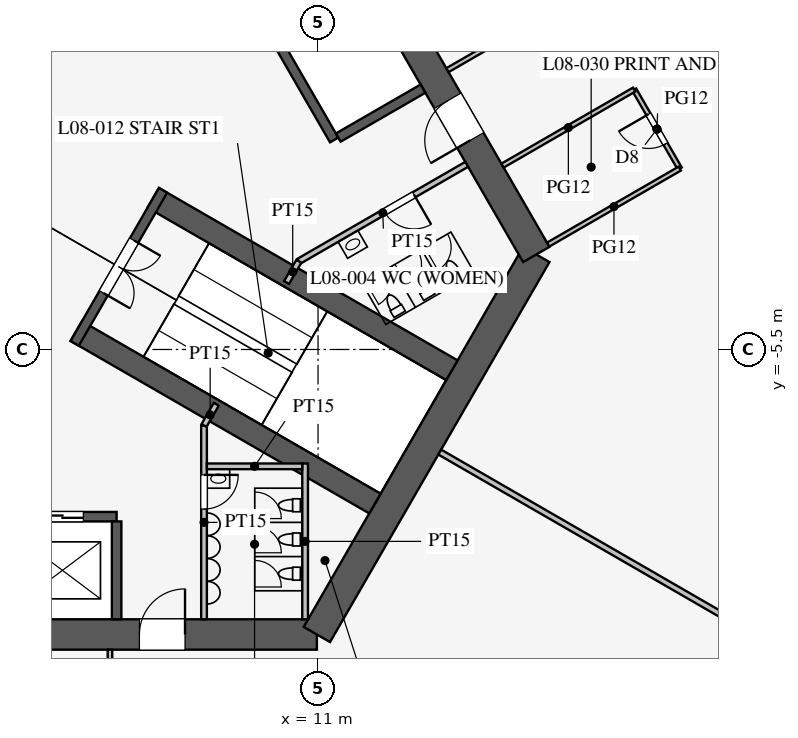
"""IFC4 building model, lengths in metres.
Left out: names, types, materials, properties, quantities, classifications, styles, units other than length and angle.
Written with IfcOpenShell. Run it as: python <this file> out.ifc"""

import sys

from ifc_helpers import new_model, si_unit, direction, frame, frame_2d, origin, place, context, subcontext, project, spatial, rectangle, extrude, element, fill, save


model = new_model("IFC4")
c1 = context("Model", 3, precision=1e-05, world=origin(), true_north=direction((0.0, 1.0)))
c2 = subcontext(c1, "Body", "Model", "MODEL_VIEW")
j1 = project(units=[si_unit("LENGTHUNIT", "METRE"), si_unit("PLANEANGLEUNIT", "RADIAN")], contexts=[c1])
p1 = place(None, origin())
s1 = spatial("IfcSite", under=j1, at=p1, CompositionType="ELEMENT")
p2 = place(p1, origin())
s2 = spatial("IfcBuilding", under=s1, at=p2, CompositionType="ELEMENT")
p3 = place(p2, frame((0.0, 0.0, 37.5)))
s3 = spatial("IfcBuildingStorey", under=s2, at=p3, CompositionType="ELEMENT", Elevation=37.5)
p4 = place(p3, frame((-10.97, -13.0, 0.0), z_axis=(0.0, 0.0, 1.0), x_axis=(1.0, 0.0, 0.0)))
e1 = element("IfcWall", 1, at=p4, inside=s3, PredefinedType="SHEAR", context=c2, shape_type="SweptSolid", body=[
    extrude(rectangle(XDim=21.939, YDim=0.8, at=frame_2d((10.97, 0.0))), origin(), (0.0, 0.0, 1.0), 4.2),
])
p5 = place(p4, frame((17.27, 0.0, 0.0)))
e2 = element("IfcOpeningElement", 2, at=p5, cuts=e1, PredefinedType="OPENING", context=c2, shape_type="SweptSolid", body=[
    extrude(rectangle(XDim=1.2, YDim=2.1, at=frame_2d((0.6, 1.05))), frame((0.0, 0.41, 0.0), z_axis=(0.0, -1.0, 0.0), x_axis=(1.0, 0.0, 0.0)), (0.0, 0.0, 1.0), 0.82),
])
p6 = place(p4, frame((3.47, 0.0, 0.0)))
e3 = element("IfcOpeningElement", 3, at=p6, cuts=e1, PredefinedType="OPENING", context=c2, shape_type="SweptSolid", body=[
    extrude(rectangle(XDim=1.2, YDim=2.1, at=frame_2d((0.6, 1.05))), frame((0.0, 0.41, 0.0), z_axis=(0.0, -1.0, 0.0), x_axis=(1.0, 0.0, 0.0)), (0.0, 0.0, 1.0), 0.82),
])
p7 = place(p3, frame((10.97, -13.0, 0.0), z_axis=(0.0, 0.0, 1.0), x_axis=(0.499995765644, 0.866027848477, 0.0)))
e4 = element("IfcWall", 4, at=p7, inside=s3, PredefinedType="SHEAR", context=c2, shape_type="SweptSolid", body=[
    extrude(rectangle(XDim=11.547, YDim=0.8, at=frame_2d((5.773, 0.0))), origin(), (0.0, 0.0, 1.0), 4.2),
])
p8 = place(p3, frame((16.743, -3.0, 0.0), z_axis=(0.0, 0.0, 1.0), x_axis=(-0.500002442456, 0.866023993627, 0.0)))
e5 = element("IfcWall", 5, at=p8, inside=s3, PredefinedType="SHEAR", context=c2, shape_type="SweptSolid", body=[
    extrude(rectangle(XDim=21.939, YDim=0.8, at=frame_2d((10.97, 0.0))), origin(), (0.0, 0.0, 1.0), 4.2),
])
p9 = place(p8, frame((17.27, 0.0, 0.0)))
e6 = element("IfcOpeningElement", 6, at=p9, cuts=e5, PredefinedType="OPENING", context=c2, shape_type="SweptSolid", body=[
    extrude(rectangle(XDim=1.2, YDim=2.1, at=frame_2d((0.6, 1.05))), frame((0.0, 0.41, 0.0), z_axis=(0.0, -1.0, 0.0), x_axis=(1.0, 0.0, 0.0)), (0.0, 0.0, 1.0), 0.82),
])
p10 = place(p8, frame((3.47, 0.0, 0.0)))
e7 = element("IfcOpeningElement", 7, at=p10, cuts=e5, PredefinedType="OPENING", context=c2, shape_type="SweptSolid", body=[
    extrude(rectangle(XDim=1.2, YDim=2.1, at=frame_2d((0.6, 1.05))), frame((0.0, 0.41, 0.0), z_axis=(0.0, -1.0, 0.0), x_axis=(1.0, 0.0, 0.0)), (0.0, 0.0, 1.0), 0.82),
])
p11 = place(p3, frame((-5.7, -9.9, 0.0), z_axis=(0.0, 0.0, 1.0), x_axis=(1.0, 0.0, 0.0)))
e8 = element("IfcWall", 8, at=p11, inside=s3, PredefinedType="SHEAR", context=c2, shape_type="SweptSolid", body=[
    extrude(rectangle(XDim=11.4, YDim=0.25, at=frame_2d((5.7, 0.0))), origin(), (0.0, 0.0, 1.0), 4.2),
])
p12 = place(p11, frame((0.875, 0.0, 0.0)))
e9 = element("IfcOpeningElement", 9, at=p12, cuts=e8, PredefinedType="OPENING", context=c2, shape_type="SweptSolid", body=[
    extrude(rectangle(XDim=1.1, YDim=2.2, at=frame_2d((0.55, 1.1))), frame((0.0, 0.135, 0.0), z_axis=(0.0, -1.0, 0.0), x_axis=(1.0, 0.0, 0.0)), (0.0, 0.0, 1.0), 0.27),
])
p13 = place(p11, frame((3.725, 0.0, 0.0)))
e10 = element("IfcOpeningElement", 10, at=p13, cuts=e8, PredefinedType="OPENING", context=c2, shape_type="SweptSolid", body=[
    extrude(rectangle(XDim=1.1, YDim=2.2, at=frame_2d((0.55, 1.1))), frame((0.0, 0.135, 0.0), z_axis=(0.0, -1.0, 0.0), x_axis=(1.0, 0.0, 0.0)), (0.0, 0.0, 1.0), 0.27),
])
p14 = place(p11, frame((6.575, 0.0, 0.0)))
e11 = element("IfcOpeningElement", 11, at=p14, cuts=e8, PredefinedType="OPENING", context=c2, shape_type="SweptSolid", body=[
    extrude(rectangle(XDim=1.1, YDim=2.2, at=frame_2d((0.55, 1.1))), frame((0.0, 0.135, 0.0), z_axis=(0.0, -1.0, 0.0), x_axis=(1.0, 0.0, 0.0)), (0.0, 0.0, 1.0), 0.27),
])
p15 = place(p11, frame((9.425, 0.0, 0.0)))
e12 = element("IfcOpeningElement", 12, at=p15, cuts=e8, PredefinedType="OPENING", context=c2, shape_type="SweptSolid", body=[
    extrude(rectangle(XDim=1.1, YDim=2.2, at=frame_2d((0.55, 1.1))), frame((0.0, 0.135, 0.0), z_axis=(0.0, -1.0, 0.0), x_axis=(1.0, 0.0, 0.0)), (0.0, 0.0, 1.0), 0.27),
])
p16 = place(p3, frame((5.7, -10.025, 0.0), z_axis=(0.0, 0.0, 1.0), x_axis=(0.0, -1.0, 0.0)))
e13 = element("IfcWall", 13, at=p16, inside=s3, PredefinedType="SHEAR", context=c2, shape_type="SweptSolid", body=[
    extrude(rectangle(XDim=2.575, YDim=0.25, at=frame_2d((1.288, 0.0))), origin(), (0.0, 0.0, 1.0), 4.2),
])
p17 = place(p3, frame((11.424, 0.014, 0.0), z_axis=(0.0, 0.0, 1.0), x_axis=(-0.500001763848, 0.866024385424, 0.0)))
e14 = element("IfcWall", 14, at=p17, inside=s3, PredefinedType="SHEAR", context=c2, shape_type="SweptSolid", body=[
    extrude(rectangle(XDim=11.4, YDim=0.25, at=frame_2d((5.7, 0.0))), origin(), (0.0, 0.0, 1.0), 4.2),
])
p18 = place(p3, frame((11.532, 0.076, 0.0), z_axis=(0.0, 0.0, 1.0), x_axis=(0.866005588531, 0.500034319456, 0.0)))
e15 = element("IfcWall", 15, at=p18, inside=s3, PredefinedType="SHEAR", context=c2, shape_type="SweptSolid", body=[
    extrude(rectangle(XDim=2.575, YDim=0.25, at=frame_2d((1.288, 0.0))), origin(), (0.0, 0.0, 1.0), 4.2),
])
for number, where, z_axis, x_axis in (
    (16, (4.638, -5.016, 0.0), (0.0, 0.0, 1.0), (0.866, -0.5, 0.0)),
    (17, (6.663, -1.509, 0.0), (0.0, 0.0, 1.0), (0.866, -0.5, 0.0)),
):
    element("IfcWall", number, at=place(p3, frame(where, z_axis=z_axis, x_axis=x_axis)), inside=s3, PredefinedType="SHEAR", context=c2, shape_type="SweptSolid", body=[
        extrude(rectangle(XDim=9.075, YDim=0.6, at=frame_2d((4.538, 0.0))), origin(), (0.0, 0.0, 1.0), 4.2),
    ])
p19 = place(p3, frame((4.597, -5.339, 0.0), z_axis=(0.0, 0.0, 1.0), x_axis=(0.499984536904, 0.866034331223, 0.0)))
e18 = element("IfcWall", 18, at=p19, inside=s3, PredefinedType="SHEAR", context=c2, shape_type="SweptSolid", body=[
    extrude(rectangle(XDim=4.65, YDim=0.25, at=frame_2d((2.325, 0.0))), origin(), (0.0, 0.0, 1.0), 4.2),
])
p20 = place(p19, frame((1.525, 0.0, 0.0)))
e19 = element("IfcOpeningElement", 19, at=p20, cuts=e18, PredefinedType="OPENING", context=c2, shape_type="SweptSolid", body=[
    extrude(rectangle(XDim=1.6, YDim=2.1, at=frame_2d((0.8, 1.05))), frame((0.0, 0.135, 0.0), z_axis=(0.0, -1.0, 0.0), x_axis=(1.0, 0.0, 0.0)), (0.0, 0.0, 1.0), 0.27),
])
p21 = place(p3, frame((8.0, -7.5, 0.0), z_axis=(0.0, 0.0, 1.0), x_axis=(0.0, -1.0, 0.0)))
e20 = element("IfcWall", 20, at=p21, inside=s3, PredefinedType="PARTITIONING", context=c2, shape_type="SweptSolid", body=[
    extrude(rectangle(XDim=5.1, YDim=0.15, at=frame_2d((2.55, 0.0))), origin(), (0.0, 0.0, 1.0), 4.0),
])
p22 = place(p21, frame((1.3, 0.0, 0.0)))
e21 = element("IfcOpeningElement", 21, at=p22, cuts=e20, PredefinedType="OPENING", context=c2, shape_type="SweptSolid", body=[
    extrude(rectangle(XDim=0.9, YDim=2.1, at=frame_2d((0.45, 1.05))), frame((0.0, 0.085, 0.0), z_axis=(0.0, -1.0, 0.0), x_axis=(1.0, 0.0, 0.0)), (0.0, 0.0, 1.0), 0.17),
])
p23 = place(p3, frame((10.495, -3.178, 0.0), z_axis=(0.0, 0.0, 1.0), x_axis=(0.86602216432, 0.500005610874, 0.0)))
e22 = element("IfcWall", 22, at=p23, inside=s3, PredefinedType="PARTITIONING", context=c2, shape_type="SweptSolid", body=[
    extrude(rectangle(XDim=5.1, YDim=0.15, at=frame_2d((2.55, 0.0))), origin(), (0.0, 0.0, 1.0), 4.0),
])
p24 = place(p23, frame((2.6, 0.0, 0.0)))
e23 = element("IfcOpeningElement", 23, at=p24, cuts=e22, PredefinedType="OPENING", context=c2, shape_type="SweptSolid", body=[
    extrude(rectangle(XDim=0.9, YDim=2.1, at=frame_2d((0.45, 1.05))), frame((0.0, 0.085, 0.0), z_axis=(0.0, -1.0, 0.0), x_axis=(1.0, 0.0, 0.0)), (0.0, 0.0, 1.0), 0.17),
])
for number, where, z_axis, x_axis in (
    (24, (8.0, -7.5, 0.0), (0.0, 0.0, 1.0), (0.5, 0.866, 0.0)),
    (25, (10.495, -3.178, 0.0), (0.0, 0.0, 1.0), (-0.5, -0.866, 0.0)),
):
    element("IfcWall", number, at=place(p3, frame(where, z_axis=z_axis, x_axis=x_axis)), inside=s3, PredefinedType="PARTITIONING", context=c2, shape_type="SweptSolid", body=[
        extrude(rectangle(XDim=0.645, YDim=0.15, at=frame_2d((0.323, 0.0))), origin(), (0.0, 0.0, 1.0), 4.0),
    ])
p25 = place(p3, frame((10.66, -8.5, 0.0), z_axis=(0.0, 0.0, 1.0), x_axis=(0.0, -1.0, 0.0)))
e26 = element("IfcWall", 26, at=p25, inside=s3, PredefinedType="PARTITIONING", context=c2, shape_type="SweptSolid", body=[
    extrude(rectangle(XDim=4.1, YDim=0.15, at=frame_2d((2.05, 0.0))), origin(), (0.0, 0.0, 1.0), 4.0),
])
p26 = place(p3, frame((8.075, -8.575, 0.0), z_axis=(0.0, 0.0, 1.0), x_axis=(1.0, 0.0, 0.0)))
e27 = element("IfcWall", 27, at=p26, inside=s3, PredefinedType="PARTITIONING", context=c2, shape_type="SweptSolid", body=[
    extrude(rectangle(XDim=2.51, YDim=0.15, at=frame_2d((1.255, 0.0))), origin(), (0.0, 0.0, 1.0), 4.0),
])
p27 = place(p3, frame((14.203, -8.2, 0.0), z_axis=(0.0, 0.0, 1.0), x_axis=(0.866024965723, -0.500000758745, 0.0)))
e28 = element("IfcWall", 28, at=p27, inside=s3, PredefinedType="PARTITIONING", context=c2, shape_type="SweptSolid", body=[
    extrude(rectangle(XDim=18.25, YDim=0.15, at=frame_2d((9.125, 0.0))), origin(), (0.0, 0.0, 1.0), 2.3),
])
p28 = place(p3, frame((5.525, -13.4, 0.0), z_axis=(0.0, 0.0, 1.0), x_axis=(0.0, -1.0, 0.0)))
e29 = element("IfcWall", 29, at=p28, inside=s3, PredefinedType="PARTITIONING", context=c2, shape_type="SweptSolid", body=[
    extrude(rectangle(XDim=4.0, YDim=0.12, at=frame_2d((2.0, 0.0))), origin(), (0.0, 0.0, 1.0), 2.9),
])
p29 = place(p3, frame((20.519, -0.74, 0.0), z_axis=(0.0, 0.0, 1.0), x_axis=(-0.499957262057, 0.866050077142, 0.0)))
e30 = element("IfcWall", 30, at=p29, inside=s3, PredefinedType="PARTITIONING", context=c2, shape_type="SweptSolid", body=[
    extrude(rectangle(XDim=2.4, YDim=0.12, at=frame_2d((1.2, 0.0))), origin(), (0.0, 0.0, 1.0), 2.9),
])
p30 = place(p29, frame((0.75, 0.0, 0.15)))
e31 = element("IfcOpeningElement", 31, at=p30, cuts=e30, PredefinedType="OPENING", context=c2, shape_type="SweptSolid", body=[
    extrude(rectangle(XDim=0.9, YDim=2.1, at=frame_2d((0.45, 1.05))), frame((0.0, 0.07, 0.0), z_axis=(0.0, -1.0, 0.0), x_axis=(1.0, 0.0, 0.0)), (0.0, 0.0, 1.0), 0.14),
])
for number, where, z_axis, x_axis in (
    (32, (17.055, -2.74, 0.0), (0.0, 0.0, 1.0), (0.866, 0.5, 0.0)),
    (33, (14.405, 1.85, 0.0), (0.0, 0.0, 1.0), (0.866, 0.5, 0.0)),
    (34, (15.855, -0.661, 0.0), (0.0, 0.0, 1.0), (0.866, 0.5, 0.0)),
):
    element("IfcWall", number, at=place(p3, frame(where, z_axis=z_axis, x_axis=x_axis)), inside=s3, PredefinedType="PARTITIONING", context=c2, shape_type="SweptSolid", body=[
        extrude(rectangle(XDim=4.0, YDim=0.12, at=frame_2d((2.0, 0.0))), origin(), (0.0, 0.0, 1.0), 2.9),
    ])
p31 = place(p22, origin())
e35 = element("IfcDoor", 35, at=p31, inside=s3, OperationType="SINGLE_SWING_LEFT", PredefinedType="DOOR", context=c2, shape_type="SweptSolid", body=[
    extrude(rectangle(XDim=0.9, YDim=2.1, at=frame_2d((0.45, 1.05))), frame((0.0, 0.025, 0.0), z_axis=(0.0, -1.0, 0.0), x_axis=(1.0, 0.0, 0.0)), (0.0, 0.0, 1.0), 0.05),
])
fill(e21, e35)
p32 = place(p24, frame((0.9, 0.0, 0.0), z_axis=(0.0, 0.0, 1.0), x_axis=(-1.0, 0.0, 0.0)))
e36 = element("IfcDoor", 36, at=p32, inside=s3, OperationType="SINGLE_SWING_LEFT", PredefinedType="DOOR", context=c2, shape_type="SweptSolid", body=[
    extrude(rectangle(XDim=0.9, YDim=2.1, at=frame_2d((0.45, 1.05))), frame((0.0, 0.025, 0.0), z_axis=(0.0, -1.0, 0.0), x_axis=(1.0, 0.0, 0.0)), (0.0, 0.0, 1.0), 0.05),
])
fill(e23, e36)
p33 = place(p20, frame((1.6, 0.0, 0.0), z_axis=(0.0, 0.0, 1.0), x_axis=(-1.0, 0.0, 0.0)))
e37 = element("IfcDoor", 37, at=p33, inside=s3, OperationType="DOUBLE_DOOR_SINGLE_SWING", PredefinedType="DOOR", context=c2, shape_type="SweptSolid", body=[
    extrude(rectangle(XDim=1.6, YDim=2.1, at=frame_2d((0.8, 1.05))), frame((0.0, 0.025, 0.0), z_axis=(0.0, -1.0, 0.0), x_axis=(1.0, 0.0, 0.0)), (0.0, 0.0, 1.0), 0.05),
])
fill(e19, e37)
p34 = place(p5, origin())
e38 = element("IfcDoor", 38, at=p34, inside=s3, OperationType="SINGLE_SWING_RIGHT", PredefinedType="DOOR", context=c2, shape_type="SweptSolid", body=[
    extrude(rectangle(XDim=1.2, YDim=2.1, at=frame_2d((0.6, 1.05))), frame((0.0, 0.025, 0.0), z_axis=(0.0, -1.0, 0.0), x_axis=(1.0, 0.0, 0.0)), (0.0, 0.0, 1.0), 0.05),
])
fill(e2, e38)
p35 = place(p10, origin())
e39 = element("IfcDoor", 39, at=p35, inside=s3, OperationType="SINGLE_SWING_LEFT", PredefinedType="DOOR", context=c2, shape_type="SweptSolid", body=[
    extrude(rectangle(XDim=1.2, YDim=2.1, at=frame_2d((0.6, 1.05))), frame((0.0, 0.025, 0.0), z_axis=(0.0, -1.0, 0.0), x_axis=(1.0, 0.0, 0.0)), (0.0, 0.0, 1.0), 0.05),
])
fill(e7, e39)
p36 = place(p30, origin())
e40 = element("IfcDoor", 40, at=p36, inside=s3, OperationType="SINGLE_SWING_RIGHT", PredefinedType="DOOR", context=c2, shape_type="SweptSolid", body=[
    extrude(rectangle(XDim=0.9, YDim=2.1, at=frame_2d((0.45, 1.05))), frame((0.0, 0.025, 0.0), z_axis=(0.0, -1.0, 0.0), x_axis=(1.0, 0.0, 0.0)), (0.0, 0.0, 1.0), 0.05),
])
fill(e31, e40)
p37 = place(p15, origin())
e41 = element("IfcDoor", 41, at=p37, inside=s3, OperationType="DOUBLE_DOOR_SLIDING", PredefinedType="DOOR", context=c2, shape_type="SweptSolid", body=[
    extrude(rectangle(XDim=1.1, YDim=2.2, at=frame_2d((0.55, 1.1))), frame((0.0, 0.025, 0.0), z_axis=(0.0, -1.0, 0.0), x_axis=(1.0, 0.0, 0.0)), (0.0, 0.0, 1.0), 0.05),
])
fill(e12, e41)
save(model, sys.argv[1])
